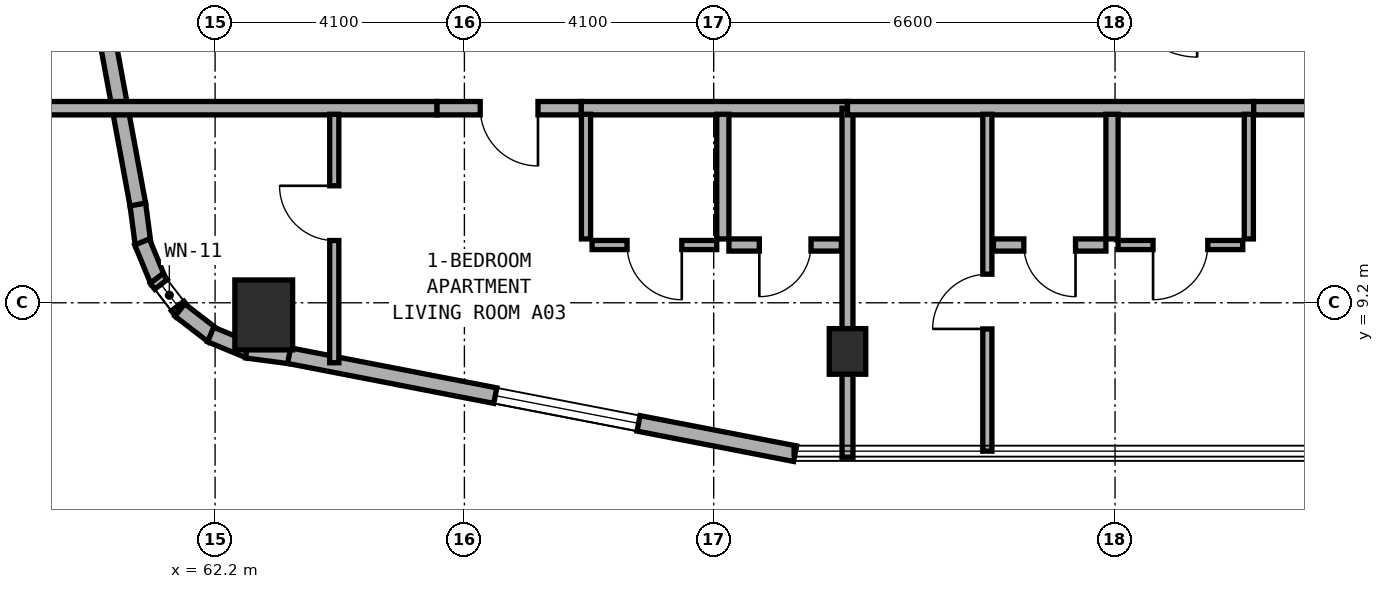
"""IFC4 building model, lengths in metres.
Left out: names, types, materials, properties, quantities, classifications, styles, units other than length and angle.
Written with IfcOpenShell. Run it as: python <this file> out.ifc"""

import sys

from ifc_helpers import new_model, si_unit, direction, frame, frame_2d, origin, origin_2d, place, context, subcontext, project, spatial, rectangle, extrude, element, fill, save


model = new_model("IFC4")
c1 = context("Model", 3, precision=1e-05, world=origin(), true_north=direction((0.0, 1.0)))
c2 = subcontext(c1, "Body", "Model", "MODEL_VIEW")
j1 = project(units=[si_unit("LENGTHUNIT", "METRE"), si_unit("PLANEANGLEUNIT", "RADIAN")], contexts=[c1])
p1 = place(None, origin())
s1 = spatial("IfcSite", under=j1, at=p1, CompositionType="ELEMENT")
p2 = place(p1, origin())
s2 = spatial("IfcBuilding", under=s1, at=p2, CompositionType="ELEMENT")
p3 = place(p2, frame((0.0, 0.0, 95.0)))
s3 = spatial("IfcBuildingStorey", under=s2, at=p3, CompositionType="ELEMENT", Elevation=95.0)
p4 = place(p3, frame((72.6, 8.4, 0.0), z_axis=(0.0, 0.0, 1.0), x_axis=(1.0, 0.0, 0.0)))
e1 = element("IfcColumn", 1, at=p4, inside=s3, PredefinedType="COLUMN", context=c2, shape_type="SweptSolid", body=[
    extrude(rectangle(XDim=0.6, YDim=0.75, at=origin_2d()), origin(), (0.0, 0.0, 1.0), 3.5),
])
p5 = place(p3, frame((63.0, 9.0, 0.0), z_axis=(0.0, 0.0, 1.0), x_axis=(1.0, 0.0, 0.0)))
e2 = element("IfcColumn", 2, at=p5, inside=s3, PredefinedType="COLUMN", context=c2, shape_type="SweptSolid", body=[
    extrude(rectangle(XDim=0.95, YDim=1.15, at=origin_2d()), origin(), (0.0, 0.0, 1.0), 3.5),
])
p6 = place(p3, frame((60.928, 10.825, 0.0), z_axis=(0.0, 0.0, 1.0), x_axis=(0.131667498923, -0.991293937098, 0.0)))
e3 = element("IfcWall", 3, at=p6, inside=s3, PredefinedType="STANDARD", context=c2, shape_type="SweptSolid", body=[
    extrude(rectangle(XDim=0.677, YDim=0.26, at=frame_2d((0.338, 0.0))), origin(), (0.0, 0.0, 1.0), 3.25),
])
p7 = place(p3, frame((60.999, 10.2, 0.0), z_axis=(0.0, 0.0, 1.0), x_axis=(0.381988976935, -0.924166879681, 0.0)))
e4 = element("IfcWall", 4, at=p7, inside=s3, PredefinedType="STANDARD", context=c2, shape_type="SweptSolid", body=[
    extrude(rectangle(XDim=0.693, YDim=0.26, at=frame_2d((0.347, 0.0))), origin(), (0.0, 0.0, 1.0), 3.25),
])
p8 = place(p3, frame((61.236, 9.599, 0.0), z_axis=(0.0, 0.0, 1.0), x_axis=(0.609472651958, -0.792807092876, 0.0)))
e5 = element("IfcWall", 5, at=p8, inside=s3, PredefinedType="STANDARD", context=c2, shape_type="SweptSolid", body=[
    extrude(rectangle(XDim=0.694, YDim=0.26, at=frame_2d((0.347, 0.0))), origin(), (0.0, 0.0, 1.0), 3.25),
])
p9 = place(p8, frame((0.122, 0.0, 0.85)))
e6 = element("IfcOpeningElement", 6, at=p9, cuts=e5, PredefinedType="OPENING", context=c2, shape_type="SweptSolid", body=[
    extrude(rectangle(XDim=0.45, YDim=1.5, at=frame_2d((0.225, 0.75))), frame((0.0, 0.14, 0.0), z_axis=(0.0, -1.0, 0.0), x_axis=(1.0, 0.0, 0.0)), (0.0, 0.0, 1.0), 0.28),
])
p10 = place(p3, frame((61.621, 9.08, 0.0), z_axis=(0.0, 0.0, 1.0), x_axis=(0.792506234191, -0.609863811657, 0.0)))
e7 = element("IfcWall", 7, at=p10, inside=s3, PredefinedType="STANDARD", context=c2, shape_type="SweptSolid", body=[
    extrude(rectangle(XDim=0.694, YDim=0.26, at=frame_2d((0.347, 0.0))), origin(), (0.0, 0.0, 1.0), 3.25),
])
p11 = place(p3, frame((62.127, 8.678, 0.0), z_axis=(0.0, 0.0, 1.0), x_axis=(0.92421822618, -0.381864727877, 0.0)))
e8 = element("IfcWall", 8, at=p11, inside=s3, PredefinedType="STANDARD", context=c2, shape_type="SweptSolid", body=[
    extrude(rectangle(XDim=0.694, YDim=0.26, at=frame_2d((0.347, 0.0))), origin(), (0.0, 0.0, 1.0), 3.25),
])
p12 = place(p3, frame((62.719, 8.421, 0.0), z_axis=(0.0, 0.0, 1.0), x_axis=(0.991433279471, -0.130614135366, 0.0)))
e9 = element("IfcWall", 9, at=p12, inside=s3, PredefinedType="STANDARD", context=c2, shape_type="SweptSolid", body=[
    extrude(rectangle(XDim=0.712, YDim=0.26, at=frame_2d((0.356, 0.0))), origin(), (0.0, 0.0, 1.0), 3.25),
])
p13 = place(p3, frame((63.417, 8.33, 0.0), z_axis=(0.0, 0.0, 1.0), x_axis=(0.981750199588, -0.190175039396, 0.0)))
e10 = element("IfcWall", 10, at=p13, inside=s3, PredefinedType="STANDARD", context=c2, shape_type="SweptSolid", body=[
    extrude(rectangle(XDim=8.477, YDim=0.26, at=frame_2d((4.238, 0.0))), origin(), (0.0, 0.0, 1.0), 3.25),
])
p14 = place(p13, frame((3.454, 0.0, 0.8)))
e11 = element("IfcOpeningElement", 11, at=p14, cuts=e10, PredefinedType="OPENING", context=c2, shape_type="SweptSolid", body=[
    extrude(rectangle(XDim=2.4, YDim=1.6, at=frame_2d((1.2, 0.8))), frame((0.0, 0.14, 0.0), z_axis=(0.0, -1.0, 0.0), x_axis=(1.0, 0.0, 0.0)), (0.0, 0.0, 1.0), 0.28),
])
p15 = place(p3, frame((59.318, 19.558, 0.0), z_axis=(0.0, 0.0, 1.0), x_axis=(0.181209963057, -0.983444431215, 0.0)))
e12 = element("IfcWall", 12, at=p15, inside=s3, PredefinedType="STANDARD", context=c2, shape_type="SweptSolid", body=[
    extrude(rectangle(XDim=8.889, YDim=0.26, at=frame_2d((4.445, 0.0))), origin(), (0.0, 0.0, 1.0), 3.25),
])
p16 = place(p15, frame((1.444, 0.0, 0.8)))
e13 = element("IfcOpeningElement", 13, at=p16, cuts=e12, PredefinedType="OPENING", context=c2, shape_type="SweptSolid", body=[
    extrude(rectangle(XDim=2.4, YDim=1.6, at=frame_2d((1.2, 0.8))), frame((0.0, 0.14, 0.0), z_axis=(0.0, -1.0, 0.0), x_axis=(1.0, 0.0, 0.0)), (0.0, 0.0, 1.0), 0.28),
])
p17 = place(p3, frame((59.36, 12.4, 0.0), z_axis=(0.0, 0.0, 1.0), x_axis=(1.0, 0.0, 0.0)))
e14 = element("IfcWall", 14, at=p17, inside=s3, PredefinedType="SOLIDWALL", context=c2, shape_type="SweptSolid", body=[
    extrude(rectangle(XDim=6.49, YDim=0.22, at=frame_2d((3.245, 0.0))), origin(), (0.0, 0.0, 1.0), 2.945),
])
p18 = place(p3, frame((68.22, 12.4, 0.0), z_axis=(0.0, 0.0, 1.0), x_axis=(1.0, 0.0, 0.0)))
e15 = element("IfcWall", 15, at=p18, inside=s3, PredefinedType="SOLIDWALL", context=c2, shape_type="SweptSolid", body=[
    extrude(rectangle(XDim=4.38, YDim=0.22, at=frame_2d((2.19, 0.0))), origin(), (0.0, 0.0, 1.0), 2.825),
])
p19 = place(p3, frame((65.85, 12.4, 0.0), z_axis=(0.0, 0.0, 1.0), x_axis=(1.0, 0.0, 0.0)))
e16 = element("IfcWall", 16, at=p19, inside=s3, PredefinedType="SOLIDWALL", context=c2, shape_type="SweptSolid", body=[
    extrude(rectangle(XDim=2.37, YDim=0.22, at=frame_2d((1.185, 0.0))), origin(), (0.0, 0.0, 1.0), 3.22),
])
p20 = place(p19, frame((0.71, 0.0, 0.0)))
e17 = element("IfcOpeningElement", 17, at=p20, cuts=e16, PredefinedType="OPENING", context=c2, shape_type="SweptSolid", body=[
    extrude(rectangle(XDim=0.95, YDim=2.1, at=frame_2d((0.475, 1.05))), frame((0.0, 0.12, 0.0), z_axis=(0.0, -1.0, 0.0), x_axis=(1.0, 0.0, 0.0)), (0.0, 0.0, 1.0), 0.24),
])
p21 = place(p3, frame((64.16, 8.214, 0.0), z_axis=(0.0, 0.0, 1.0), x_axis=(0.0, 1.0, 0.0)))
e18 = element("IfcWall", 18, at=p21, inside=s3, PredefinedType="PARTITIONING", context=c2, shape_type="SweptSolid", body=[
    extrude(rectangle(XDim=4.086, YDim=0.15, at=frame_2d((2.043, 0.0))), origin(), (0.0, 0.0, 1.0), 2.945),
])
p22 = place(p21, frame((2.01, 0.0, 0.0)))
e19 = element("IfcOpeningElement", 19, at=p22, cuts=e18, PredefinedType="OPENING", context=c2, shape_type="SweptSolid", body=[
    extrude(rectangle(XDim=0.9, YDim=2.1, at=frame_2d((0.45, 1.05))), frame((0.0, 0.085, 0.0), z_axis=(0.0, -1.0, 0.0), x_axis=(1.0, 0.0, 0.0)), (0.0, 0.0, 1.0), 0.17),
])
p23 = place(p3, frame((70.55, 10.25, 0.0), z_axis=(0.0, 0.0, 1.0), x_axis=(0.0, 1.0, 0.0)))
e20 = element("IfcWall", 20, at=p23, inside=s3, PredefinedType="PLUMBINGWALL", context=c2, shape_type="SweptSolid", body=[
    extrude(rectangle(XDim=2.05, YDim=0.2, at=frame_2d((1.025, 0.0))), origin(), (0.0, 0.0, 1.0), 3.22),
])
p24 = place(p3, frame((68.3, 10.25, 0.0), z_axis=(0.0, 0.0, 1.0), x_axis=(0.0, 1.0, 0.0)))
e21 = element("IfcWall", 21, at=p24, inside=s3, PredefinedType="PARTITIONING", context=c2, shape_type="SweptSolid", body=[
    extrude(rectangle(XDim=2.05, YDim=0.15, at=frame_2d((1.025, 0.0))), origin(), (0.0, 0.0, 1.0), 3.22),
])
p25 = place(p3, frame((70.65, 10.15, 0.0), z_axis=(0.0, 0.0, 1.0), x_axis=(1.0, 0.0, 0.0)))
e22 = element("IfcWall", 22, at=p25, inside=s3, PredefinedType="PLUMBINGWALL", context=c2, shape_type="SweptSolid", body=[
    extrude(rectangle(XDim=1.85, YDim=0.2, at=frame_2d((0.925, 0.0))), origin(), (0.0, 0.0, 1.0), 3.22),
])
p26 = place(p25, frame((0.5, 0.0, 0.0)))
e23 = element("IfcOpeningElement", 23, at=p26, cuts=e22, PredefinedType="OPENING", context=c2, shape_type="SweptSolid", body=[
    extrude(rectangle(XDim=0.85, YDim=2.1, at=frame_2d((0.425, 1.05))), frame((0.0, 0.11, 0.0), z_axis=(0.0, -1.0, 0.0), x_axis=(1.0, 0.0, 0.0)), (0.0, 0.0, 1.0), 0.22),
])
p27 = place(p3, frame((68.4, 10.15, 0.0), z_axis=(0.0, 0.0, 1.0), x_axis=(1.0, 0.0, 0.0)))
e24 = element("IfcWall", 24, at=p27, inside=s3, PredefinedType="PARTITIONING", context=c2, shape_type="SweptSolid", body=[
    extrude(rectangle(XDim=2.05, YDim=0.15, at=frame_2d((1.025, 0.0))), origin(), (0.0, 0.0, 1.0), 3.22),
])
p28 = place(p27, frame((0.575, 0.0, 0.0)))
e25 = element("IfcOpeningElement", 25, at=p28, cuts=e24, PredefinedType="OPENING", context=c2, shape_type="SweptSolid", body=[
    extrude(rectangle(XDim=0.9, YDim=2.1, at=frame_2d((0.45, 1.05))), frame((0.0, 0.085, 0.0), z_axis=(0.0, -1.0, 0.0), x_axis=(1.0, 0.0, 0.0)), (0.0, 0.0, 1.0), 0.17),
])
p29 = place(p3, frame((72.6, 6.66, 0.0), z_axis=(0.0, 0.0, 1.0), x_axis=(0.0, 1.0, 0.0)))
e26 = element("IfcWall", 26, at=p29, inside=s3, PredefinedType="SOLIDWALL", context=c2, shape_type="SweptSolid", body=[
    extrude(rectangle(XDim=5.74, YDim=0.18, at=frame_2d((2.87, 0.0))), origin(), (0.0, 0.0, 1.0), 2.825),
])
p30 = place(p3, frame((72.6, 12.4, 0.0), z_axis=(0.0, 0.0, 1.0), x_axis=(1.0, 0.0, 0.0)))
e27 = element("IfcWall", 27, at=p30, inside=s3, PredefinedType="SOLIDWALL", context=c2, shape_type="SweptSolid", body=[
    extrude(rectangle(XDim=6.68, YDim=0.22, at=frame_2d((3.34, 0.0))), origin(), (0.0, 0.0, 1.0), 2.825),
])
p31 = place(p3, frame((79.28, 12.4, 0.0), z_axis=(0.0, 0.0, 1.0), x_axis=(1.0, 0.0, 0.0)))
e28 = element("IfcWall", 28, at=p31, inside=s3, PredefinedType="SOLIDWALL", context=c2, shape_type="SweptSolid", body=[
    extrude(rectangle(XDim=9.07, YDim=0.22, at=frame_2d((4.535, 0.0))), origin(), (0.0, 0.0, 1.0), 2.825),
])
p32 = place(p31, frame((4.06, 0.0, 0.0)))
e29 = element("IfcOpeningElement", 29, at=p32, cuts=e28, PredefinedType="OPENING", context=c2, shape_type="SweptSolid", body=[
    extrude(rectangle(XDim=0.95, YDim=2.1, at=frame_2d((0.475, 1.05))), frame((0.0, 0.12, 0.0), z_axis=(0.0, -1.0, 0.0), x_axis=(1.0, 0.0, 0.0)), (0.0, 0.0, 1.0), 0.24),
])
p33 = place(p3, frame((74.9, 6.76, 0.0), z_axis=(0.0, 0.0, 1.0), x_axis=(0.0, 1.0, 0.0)))
e30 = element("IfcWall", 30, at=p33, inside=s3, PredefinedType="PARTITIONING", context=c2, shape_type="SweptSolid", body=[
    extrude(rectangle(XDim=5.54, YDim=0.15, at=frame_2d((2.77, 0.0))), origin(), (0.0, 0.0, 1.0), 2.945),
])
p34 = place(p33, frame((2.01, 0.0, 0.0)))
e31 = element("IfcOpeningElement", 31, at=p34, cuts=e30, PredefinedType="OPENING", context=c2, shape_type="SweptSolid", body=[
    extrude(rectangle(XDim=0.9, YDim=2.1, at=frame_2d((0.45, 1.05))), frame((0.0, 0.085, 0.0), z_axis=(0.0, -1.0, 0.0), x_axis=(1.0, 0.0, 0.0)), (0.0, 0.0, 1.0), 0.17),
])
p35 = place(p3, frame((76.95, 10.25, 0.0), z_axis=(0.0, 0.0, 1.0), x_axis=(0.0, 1.0, 0.0)))
e32 = element("IfcWall", 32, at=p35, inside=s3, PredefinedType="PLUMBINGWALL", context=c2, shape_type="SweptSolid", body=[
    extrude(rectangle(XDim=2.05, YDim=0.2, at=frame_2d((1.025, 0.0))), origin(), (0.0, 0.0, 1.0), 2.955),
])
p36 = place(p3, frame((79.2, 10.25, 0.0), z_axis=(0.0, 0.0, 1.0), x_axis=(0.0, 1.0, 0.0)))
e33 = element("IfcWall", 33, at=p36, inside=s3, PredefinedType="PARTITIONING", context=c2, shape_type="SweptSolid", body=[
    extrude(rectangle(XDim=2.05, YDim=0.15, at=frame_2d((1.025, 0.0))), origin(), (0.0, 0.0, 1.0), 2.955),
])
p37 = place(p3, frame((75.0, 10.15, 0.0), z_axis=(0.0, 0.0, 1.0), x_axis=(1.0, 0.0, 0.0)))
e34 = element("IfcWall", 34, at=p37, inside=s3, PredefinedType="PLUMBINGWALL", context=c2, shape_type="SweptSolid", body=[
    extrude(rectangle(XDim=1.85, YDim=0.2, at=frame_2d((0.925, 0.0))), origin(), (0.0, 0.0, 1.0), 3.22),
])
p38 = place(p37, frame((0.5, 0.0, 0.0)))
e35 = element("IfcOpeningElement", 35, at=p38, cuts=e34, PredefinedType="OPENING", context=c2, shape_type="SweptSolid", body=[
    extrude(rectangle(XDim=0.85, YDim=2.1, at=frame_2d((0.425, 1.05))), frame((0.0, 0.11, 0.0), z_axis=(0.0, -1.0, 0.0), x_axis=(1.0, 0.0, 0.0)), (0.0, 0.0, 1.0), 0.22),
])
p39 = place(p3, frame((77.05, 10.15, 0.0), z_axis=(0.0, 0.0, 1.0), x_axis=(1.0, 0.0, 0.0)))
e36 = element("IfcWall", 36, at=p39, inside=s3, PredefinedType="PARTITIONING", context=c2, shape_type="SweptSolid", body=[
    extrude(rectangle(XDim=2.05, YDim=0.15, at=frame_2d((1.025, 0.0))), origin(), (0.0, 0.0, 1.0), 3.22),
])
p40 = place(p39, frame((0.575, 0.0, 0.0)))
e37 = element("IfcOpeningElement", 37, at=p40, cuts=e36, PredefinedType="OPENING", context=c2, shape_type="SweptSolid", body=[
    extrude(rectangle(XDim=0.9, YDim=2.1, at=frame_2d((0.45, 1.05))), frame((0.0, 0.085, 0.0), z_axis=(0.0, -1.0, 0.0), x_axis=(1.0, 0.0, 0.0)), (0.0, 0.0, 1.0), 0.17),
])
p41 = place(p14, origin())
e38 = element("IfcWindow", 38, at=p41, inside=s3, PartitioningType="SINGLE_PANEL", PredefinedType="WINDOW", context=c2, shape_type="SweptSolid", body=[
    extrude(rectangle(XDim=2.4, YDim=1.6, at=frame_2d((1.2, 0.8))), frame((0.0, 0.03, 0.0), z_axis=(0.0, -1.0, 0.0), x_axis=(1.0, 0.0, 0.0)), (0.0, 0.0, 1.0), 0.06),
])
fill(e11, e38)
p42 = place(p9, origin())
e39 = element("IfcWindow", 39, at=p42, inside=s3, PartitioningType="SINGLE_PANEL", PredefinedType="WINDOW", context=c2, shape_type="SweptSolid", body=[
    extrude(rectangle(XDim=0.45, YDim=1.5, at=frame_2d((0.225, 0.75))), frame((0.0, 0.03, 0.0), z_axis=(0.0, -1.0, 0.0), x_axis=(1.0, 0.0, 0.0)), (0.0, 0.0, 1.0), 0.06),
])
fill(e6, e39)
p43 = place(p20, frame((0.95, 0.0, 0.0), z_axis=(0.0, 0.0, 1.0), x_axis=(-1.0, 0.0, 0.0)))
e40 = element("IfcDoor", 40, at=p43, inside=s3, OperationType="SINGLE_SWING_LEFT", PredefinedType="DOOR", context=c2, shape_type="SweptSolid", body=[
    extrude(rectangle(XDim=0.95, YDim=2.1, at=frame_2d((0.475, 1.05))), frame((0.0, 0.025, 0.0), z_axis=(0.0, -1.0, 0.0), x_axis=(1.0, 0.0, 0.0)), (0.0, 0.0, 1.0), 0.05),
])
fill(e17, e40)
p44 = place(p22, origin())
e41 = element("IfcDoor", 41, at=p44, inside=s3, OperationType="SINGLE_SWING_RIGHT", PredefinedType="DOOR", context=c2, shape_type="SweptSolid", body=[
    extrude(rectangle(XDim=0.9, YDim=2.1, at=frame_2d((0.45, 1.05))), frame((0.0, 0.025, 0.0), z_axis=(0.0, -1.0, 0.0), x_axis=(1.0, 0.0, 0.0)), (0.0, 0.0, 1.0), 0.05),
])
fill(e19, e41)
p45 = place(p26, frame((0.85, 0.0, 0.0), z_axis=(0.0, 0.0, 1.0), x_axis=(-1.0, 0.0, 0.0)))
e42 = element("IfcDoor", 42, at=p45, inside=s3, OperationType="SINGLE_SWING_RIGHT", PredefinedType="DOOR", context=c2, shape_type="SweptSolid", body=[
    extrude(rectangle(XDim=0.85, YDim=2.1, at=frame_2d((0.425, 1.05))), frame((0.0, 0.025, 0.0), z_axis=(0.0, -1.0, 0.0), x_axis=(1.0, 0.0, 0.0)), (0.0, 0.0, 1.0), 0.05),
])
fill(e23, e42)
p46 = place(p28, frame((0.9, 0.0, 0.0), z_axis=(0.0, 0.0, 1.0), x_axis=(-1.0, 0.0, 0.0)))
e43 = element("IfcDoor", 43, at=p46, inside=s3, OperationType="SINGLE_SWING_LEFT", PredefinedType="DOOR", context=c2, shape_type="SweptSolid", body=[
    extrude(rectangle(XDim=0.9, YDim=2.1, at=frame_2d((0.45, 1.05))), frame((0.0, 0.025, 0.0), z_axis=(0.0, -1.0, 0.0), x_axis=(1.0, 0.0, 0.0)), (0.0, 0.0, 1.0), 0.05),
])
fill(e25, e43)
p47 = place(p34, origin())
e44 = element("IfcDoor", 44, at=p47, inside=s3, OperationType="SINGLE_SWING_LEFT", PredefinedType="DOOR", context=c2, shape_type="SweptSolid", body=[
    extrude(rectangle(XDim=0.9, YDim=2.1, at=frame_2d((0.45, 1.05))), frame((0.0, 0.025, 0.0), z_axis=(0.0, -1.0, 0.0), x_axis=(1.0, 0.0, 0.0)), (0.0, 0.0, 1.0), 0.05),
])
fill(e31, e44)
p48 = place(p38, frame((0.85, 0.0, 0.0), z_axis=(0.0, 0.0, 1.0), x_axis=(-1.0, 0.0, 0.0)))
e45 = element("IfcDoor", 45, at=p48, inside=s3, OperationType="SINGLE_SWING_LEFT", PredefinedType="DOOR", context=c2, shape_type="SweptSolid", body=[
    extrude(rectangle(XDim=0.85, YDim=2.1, at=frame_2d((0.425, 1.05))), frame((0.0, 0.025, 0.0), z_axis=(0.0, -1.0, 0.0), x_axis=(1.0, 0.0, 0.0)), (0.0, 0.0, 1.0), 0.05),
])
fill(e35, e45)
p49 = place(p40, frame((0.9, 0.0, 0.0), z_axis=(0.0, 0.0, 1.0), x_axis=(-1.0, 0.0, 0.0)))
e46 = element("IfcDoor", 46, at=p49, inside=s3, OperationType="SINGLE_SWING_RIGHT", PredefinedType="DOOR", context=c2, shape_type="SweptSolid", body=[
    extrude(rectangle(XDim=0.9, YDim=2.1, at=frame_2d((0.45, 1.05))), frame((0.0, 0.025, 0.0), z_axis=(0.0, -1.0, 0.0), x_axis=(1.0, 0.0, 0.0)), (0.0, 0.0, 1.0), 0.05),
])
fill(e37, e46)
save(model, sys.argv[1])
